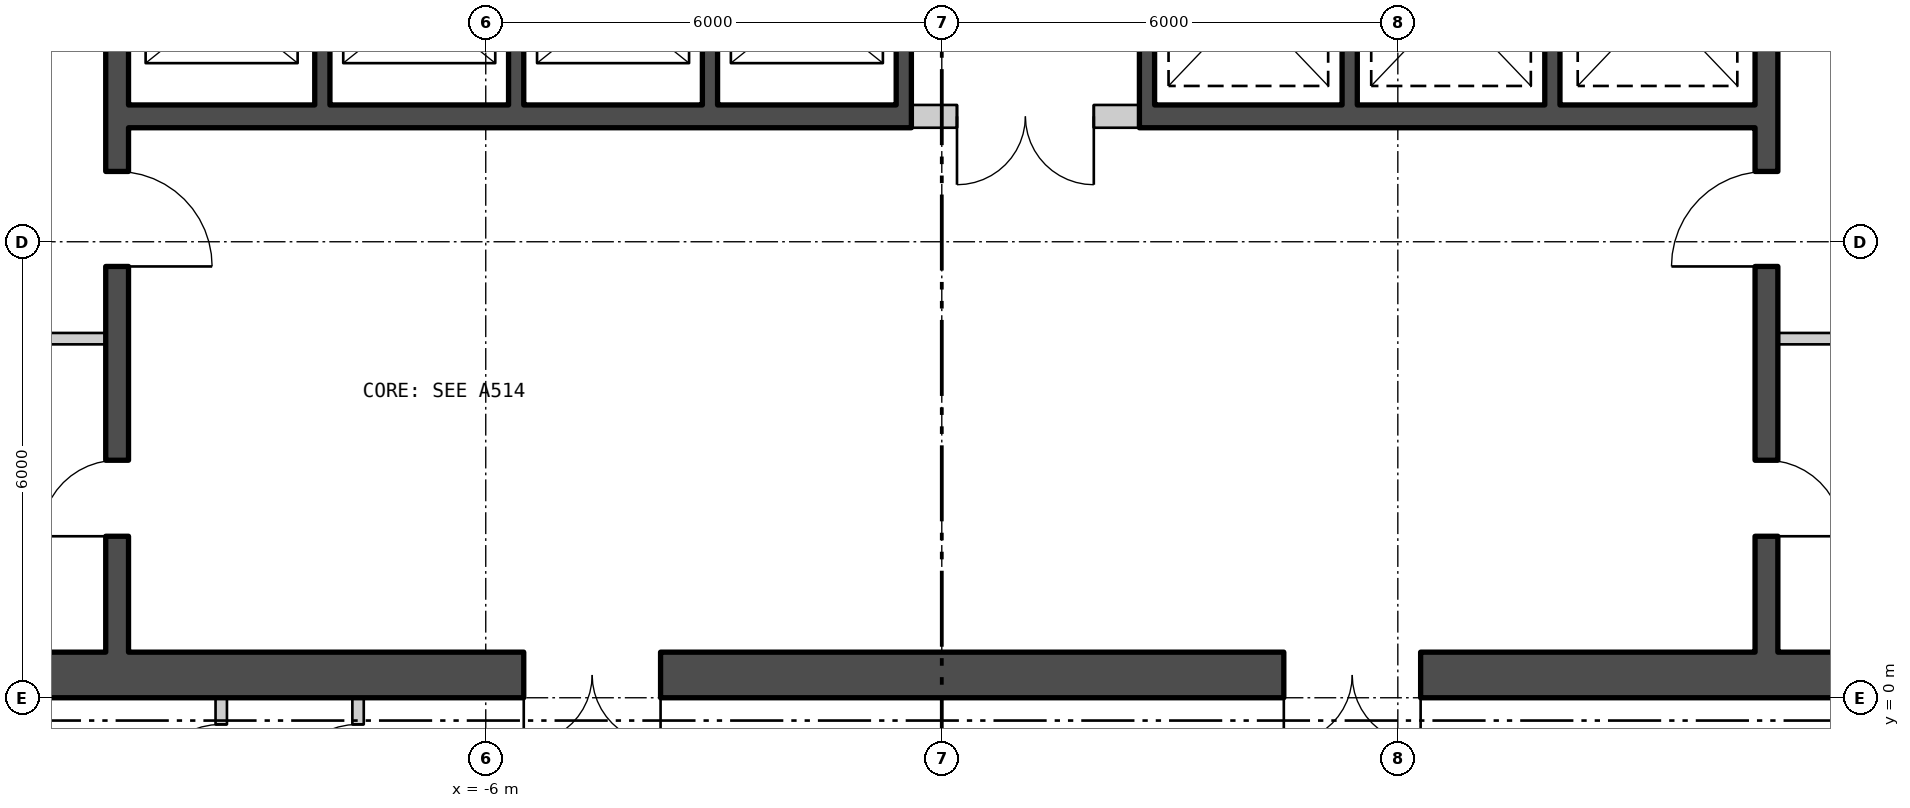
"""IFC4 building model, lengths in metres.
Left out: names, types, materials, properties, quantities, classifications, styles, units other than length and angle.
Written with IfcOpenShell. Run it as: python <this file> out.ifc"""

import sys

from ifc_helpers import new_model, si_unit, direction, frame, frame_2d, origin, place, context, subcontext, project, spatial, polyline, rectangle, outline, extrude, element, fill, save


model = new_model("IFC4")
c1 = context("Model", 3, precision=1e-05, world=origin(), true_north=direction((0.0, 1.0)))
c2 = subcontext(c1, "Body", "Model", "MODEL_VIEW")
j1 = project(units=[si_unit("LENGTHUNIT", "METRE"), si_unit("PLANEANGLEUNIT", "RADIAN")], contexts=[c1])
p1 = place(None, origin())
s1 = spatial("IfcSite", under=j1, at=p1, CompositionType="ELEMENT")
p2 = place(p1, origin())
s2 = spatial("IfcBuilding", under=s1, at=p2, CompositionType="ELEMENT")
p3 = place(p2, frame((0.0, 0.0, 78.3)))
s3 = spatial("IfcBuildingStorey", under=s2, at=p3, CompositionType="ELEMENT", Elevation=78.3)
p4 = place(p3, frame((-28.09, 10.934, -0.18), z_axis=(0.0, 0.0, 1.0), x_axis=(0.500000711659, -0.866024992908, 0.0)))
e1 = element("IfcWall", 1, at=p4, inside=s3, PredefinedType="SOLIDWALL", context=c2, shape_type="SweptSolid", body=[
    extrude(outline(polyline([(-0.13, -0.225), (45.87, -0.225), (45.61, 0.225), (0.13, 0.225), (-0.13, -0.225)])), origin(), (0.0, 0.0, 1.0), 6.0),
])
p5 = place(p4, frame((1.424, 0.0, 1.38)))
e2 = element("IfcOpeningElement", 2, at=p5, cuts=e1, PredefinedType="OPENING", context=c2, shape_type="SweptSolid", body=[
    extrude(rectangle(XDim=2.4, YDim=3.6, at=frame_2d((1.2, 1.8))), frame((0.0, 0.235, 0.0), z_axis=(0.0, -1.0, 0.0), x_axis=(1.0, 0.0, 0.0)), (0.0, 0.0, 1.0), 0.47),
])
p6 = place(p4, frame((5.893, 0.0, 1.38)))
e3 = element("IfcOpeningElement", 3, at=p6, cuts=e1, PredefinedType="OPENING", context=c2, shape_type="SweptSolid", body=[
    extrude(rectangle(XDim=2.4, YDim=3.6, at=frame_2d((1.2, 1.8))), frame((0.0, 0.235, 0.0), z_axis=(0.0, -1.0, 0.0), x_axis=(1.0, 0.0, 0.0)), (0.0, 0.0, 1.0), 0.47),
])
p7 = place(p4, frame((10.401, 0.0, 1.38)))
e4 = element("IfcOpeningElement", 4, at=p7, cuts=e1, PredefinedType="OPENING", context=c2, shape_type="SweptSolid", body=[
    extrude(rectangle(XDim=2.4, YDim=3.6, at=frame_2d((1.2, 1.8))), frame((0.0, 0.235, 0.0), z_axis=(0.0, -1.0, 0.0), x_axis=(1.0, 0.0, 0.0)), (0.0, 0.0, 1.0), 0.47),
])
p8 = place(p4, frame((14.909, 0.0, 1.38)))
e5 = element("IfcOpeningElement", 5, at=p8, cuts=e1, PredefinedType="OPENING", context=c2, shape_type="SweptSolid", body=[
    extrude(rectangle(XDim=2.4, YDim=3.6, at=frame_2d((1.2, 1.8))), frame((0.0, 0.235, 0.0), z_axis=(0.0, -1.0, 0.0), x_axis=(1.0, 0.0, 0.0)), (0.0, 0.0, 1.0), 0.47),
])
p9 = place(p4, frame((19.416, 0.0, 1.38)))
e6 = element("IfcOpeningElement", 6, at=p9, cuts=e1, PredefinedType="OPENING", context=c2, shape_type="SweptSolid", body=[
    extrude(rectangle(XDim=2.4, YDim=3.6, at=frame_2d((1.2, 1.8))), frame((0.0, 0.235, 0.0), z_axis=(0.0, -1.0, 0.0), x_axis=(1.0, 0.0, 0.0)), (0.0, 0.0, 1.0), 0.47),
])
p10 = place(p4, frame((23.924, 0.0, 1.38)))
e7 = element("IfcOpeningElement", 7, at=p10, cuts=e1, PredefinedType="OPENING", context=c2, shape_type="SweptSolid", body=[
    extrude(rectangle(XDim=2.4, YDim=3.6, at=frame_2d((1.2, 1.8))), frame((0.0, 0.235, 0.0), z_axis=(0.0, -1.0, 0.0), x_axis=(1.0, 0.0, 0.0)), (0.0, 0.0, 1.0), 0.47),
])
p11 = place(p4, frame((28.431, 0.0, 1.38)))
e8 = element("IfcOpeningElement", 8, at=p11, cuts=e1, PredefinedType="OPENING", context=c2, shape_type="SweptSolid", body=[
    extrude(rectangle(XDim=2.4, YDim=3.6, at=frame_2d((1.2, 1.8))), frame((0.0, 0.235, 0.0), z_axis=(0.0, -1.0, 0.0), x_axis=(1.0, 0.0, 0.0)), (0.0, 0.0, 1.0), 0.47),
])
p12 = place(p4, frame((32.939, 0.0, 1.38)))
e9 = element("IfcOpeningElement", 9, at=p12, cuts=e1, PredefinedType="OPENING", context=c2, shape_type="SweptSolid", body=[
    extrude(rectangle(XDim=2.4, YDim=3.6, at=frame_2d((1.2, 1.8))), frame((0.0, 0.235, 0.0), z_axis=(0.0, -1.0, 0.0), x_axis=(1.0, 0.0, 0.0)), (0.0, 0.0, 1.0), 0.47),
])
p13 = place(p4, frame((37.447, 0.0, 1.38)))
e10 = element("IfcOpeningElement", 10, at=p13, cuts=e1, PredefinedType="OPENING", context=c2, shape_type="SweptSolid", body=[
    extrude(rectangle(XDim=2.4, YDim=3.6, at=frame_2d((1.2, 1.8))), frame((0.0, 0.235, 0.0), z_axis=(0.0, -1.0, 0.0), x_axis=(1.0, 0.0, 0.0)), (0.0, 0.0, 1.0), 0.47),
])
p14 = place(p4, frame((41.916, 0.0, 1.38)))
e11 = element("IfcOpeningElement", 11, at=p14, cuts=e1, PredefinedType="OPENING", context=c2, shape_type="SweptSolid", body=[
    extrude(rectangle(XDim=2.4, YDim=3.6, at=frame_2d((1.2, 1.8))), frame((0.0, 0.235, 0.0), z_axis=(0.0, -1.0, 0.0), x_axis=(1.0, 0.0, 0.0)), (0.0, 0.0, 1.0), 0.47),
])
p15 = place(p3, frame((5.22, -28.679, -0.18), z_axis=(0.0, 0.0, 1.0), x_axis=(0.500000711659, 0.866024992908, 0.0)))
e12 = element("IfcWall", 12, at=p15, inside=s3, PredefinedType="SOLIDWALL", context=c2, shape_type="SweptSolid", body=[
    extrude(outline(polyline([(-0.13, -0.225), (45.87, -0.225), (45.61, 0.225), (0.13, 0.225), (-0.13, -0.225)])), origin(), (0.0, 0.0, 1.0), 6.0),
])
p16 = place(p15, frame((1.424, 0.0, 1.38)))
e13 = element("IfcOpeningElement", 13, at=p16, cuts=e12, PredefinedType="OPENING", context=c2, shape_type="SweptSolid", body=[
    extrude(rectangle(XDim=2.4, YDim=3.6, at=frame_2d((1.2, 1.8))), frame((0.0, 0.235, 0.0), z_axis=(0.0, -1.0, 0.0), x_axis=(1.0, 0.0, 0.0)), (0.0, 0.0, 1.0), 0.47),
])
p17 = place(p15, frame((5.893, 0.0, 1.38)))
e14 = element("IfcOpeningElement", 14, at=p17, cuts=e12, PredefinedType="OPENING", context=c2, shape_type="SweptSolid", body=[
    extrude(rectangle(XDim=2.4, YDim=3.6, at=frame_2d((1.2, 1.8))), frame((0.0, 0.235, 0.0), z_axis=(0.0, -1.0, 0.0), x_axis=(1.0, 0.0, 0.0)), (0.0, 0.0, 1.0), 0.47),
])
p18 = place(p15, frame((10.401, 0.0, 1.38)))
e15 = element("IfcOpeningElement", 15, at=p18, cuts=e12, PredefinedType="OPENING", context=c2, shape_type="SweptSolid", body=[
    extrude(rectangle(XDim=2.4, YDim=3.6, at=frame_2d((1.2, 1.8))), frame((0.0, 0.235, 0.0), z_axis=(0.0, -1.0, 0.0), x_axis=(1.0, 0.0, 0.0)), (0.0, 0.0, 1.0), 0.47),
])
p19 = place(p15, frame((14.909, 0.0, 1.38)))
e16 = element("IfcOpeningElement", 16, at=p19, cuts=e12, PredefinedType="OPENING", context=c2, shape_type="SweptSolid", body=[
    extrude(rectangle(XDim=2.4, YDim=3.6, at=frame_2d((1.2, 1.8))), frame((0.0, 0.235, 0.0), z_axis=(0.0, -1.0, 0.0), x_axis=(1.0, 0.0, 0.0)), (0.0, 0.0, 1.0), 0.47),
])
p20 = place(p15, frame((19.416, 0.0, 1.38)))
e17 = element("IfcOpeningElement", 17, at=p20, cuts=e12, PredefinedType="OPENING", context=c2, shape_type="SweptSolid", body=[
    extrude(rectangle(XDim=2.4, YDim=3.6, at=frame_2d((1.2, 1.8))), frame((0.0, 0.235, 0.0), z_axis=(0.0, -1.0, 0.0), x_axis=(1.0, 0.0, 0.0)), (0.0, 0.0, 1.0), 0.47),
])
p21 = place(p15, frame((23.924, 0.0, 1.38)))
e18 = element("IfcOpeningElement", 18, at=p21, cuts=e12, PredefinedType="OPENING", context=c2, shape_type="SweptSolid", body=[
    extrude(rectangle(XDim=2.4, YDim=3.6, at=frame_2d((1.2, 1.8))), frame((0.0, 0.235, 0.0), z_axis=(0.0, -1.0, 0.0), x_axis=(1.0, 0.0, 0.0)), (0.0, 0.0, 1.0), 0.47),
])
p22 = place(p15, frame((28.431, 0.0, 1.38)))
e19 = element("IfcOpeningElement", 19, at=p22, cuts=e12, PredefinedType="OPENING", context=c2, shape_type="SweptSolid", body=[
    extrude(rectangle(XDim=2.4, YDim=3.6, at=frame_2d((1.2, 1.8))), frame((0.0, 0.235, 0.0), z_axis=(0.0, -1.0, 0.0), x_axis=(1.0, 0.0, 0.0)), (0.0, 0.0, 1.0), 0.47),
])
p23 = place(p15, frame((32.939, 0.0, 1.38)))
e20 = element("IfcOpeningElement", 20, at=p23, cuts=e12, PredefinedType="OPENING", context=c2, shape_type="SweptSolid", body=[
    extrude(rectangle(XDim=2.4, YDim=3.6, at=frame_2d((1.2, 1.8))), frame((0.0, 0.235, 0.0), z_axis=(0.0, -1.0, 0.0), x_axis=(1.0, 0.0, 0.0)), (0.0, 0.0, 1.0), 0.47),
])
p24 = place(p15, frame((37.447, 0.0, 1.38)))
e21 = element("IfcOpeningElement", 21, at=p24, cuts=e12, PredefinedType="OPENING", context=c2, shape_type="SweptSolid", body=[
    extrude(rectangle(XDim=2.4, YDim=3.6, at=frame_2d((1.2, 1.8))), frame((0.0, 0.235, 0.0), z_axis=(0.0, -1.0, 0.0), x_axis=(1.0, 0.0, 0.0)), (0.0, 0.0, 1.0), 0.47),
])
p25 = place(p15, frame((41.916, 0.0, 1.38)))
e22 = element("IfcOpeningElement", 22, at=p25, cuts=e12, PredefinedType="OPENING", context=c2, shape_type="SweptSolid", body=[
    extrude(rectangle(XDim=2.4, YDim=3.6, at=frame_2d((1.2, 1.8))), frame((0.0, 0.235, 0.0), z_axis=(0.0, -1.0, 0.0), x_axis=(1.0, 0.0, 0.0)), (0.0, 0.0, 1.0), 0.47),
])
p26 = place(p3, frame((-17.5, 0.3, 0.0), z_axis=(0.0, 0.0, 1.0), x_axis=(1.0, 0.0, 0.0)))
e23 = element("IfcWall", 23, at=p26, inside=s3, PredefinedType="SHEAR", context=c2, shape_type="SweptSolid", body=[
    extrude(rectangle(XDim=35.0, YDim=0.6, at=frame_2d((17.5, 0.0))), origin(), (0.0, 0.0, 1.0), 5.8),
])
p27 = place(p26, frame((12.0, 0.0, 0.0)))
e24 = element("IfcOpeningElement", 24, at=p27, cuts=e23, PredefinedType="OPENING", context=c2, shape_type="SweptSolid", body=[
    extrude(rectangle(XDim=1.8, YDim=2.4, at=frame_2d((0.9, 1.2))), frame((0.0, 0.31, 0.0), z_axis=(0.0, -1.0, 0.0), x_axis=(1.0, 0.0, 0.0)), (0.0, 0.0, 1.0), 0.62),
])
p28 = place(p26, frame((22.0, 0.0, 0.0)))
e25 = element("IfcOpeningElement", 25, at=p28, cuts=e23, PredefinedType="OPENING", context=c2, shape_type="SweptSolid", body=[
    extrude(rectangle(XDim=1.8, YDim=2.4, at=frame_2d((0.9, 1.2))), frame((0.0, 0.31, 0.0), z_axis=(0.0, -1.0, 0.0), x_axis=(1.0, 0.0, 0.0)), (0.0, 0.0, 1.0), 0.62),
])
p29 = place(p3, frame((-10.85, 0.6, 0.0), z_axis=(0.0, 0.0, 1.0), x_axis=(0.0, 1.0, 0.0)))
e26 = element("IfcWall", 26, at=p29, inside=s3, PredefinedType="SHEAR", context=c2, shape_type="SweptSolid", body=[
    extrude(rectangle(XDim=16.8, YDim=0.3, at=frame_2d((8.4, 0.0))), origin(), (0.0, 0.0, 1.0), 5.8),
])
p30 = place(p29, frame((5.075, 0.0, 0.0)))
e27 = element("IfcOpeningElement", 27, at=p30, cuts=e26, PredefinedType="OPENING", context=c2, shape_type="SweptSolid", body=[
    extrude(rectangle(XDim=1.25, YDim=2.1, at=frame_2d((0.625, 1.05))), frame((0.0, 0.16, 0.0), z_axis=(0.0, -1.0, 0.0), x_axis=(1.0, 0.0, 0.0)), (0.0, 0.0, 1.0), 0.32),
])
p31 = place(p29, frame((1.525, 0.0, 0.0)))
e28 = element("IfcOpeningElement", 28, at=p31, cuts=e26, PredefinedType="OPENING", context=c2, shape_type="SweptSolid", body=[
    extrude(rectangle(XDim=1.0, YDim=2.1, at=frame_2d((0.5, 1.05))), frame((0.0, 0.16, 0.0), z_axis=(0.0, -1.0, 0.0), x_axis=(1.0, 0.0, 0.0)), (0.0, 0.0, 1.0), 0.32),
])
p32 = place(p3, frame((10.85, 0.6, 0.0), z_axis=(0.0, 0.0, 1.0), x_axis=(0.0, 1.0, 0.0)))
e29 = element("IfcWall", 29, at=p32, inside=s3, PredefinedType="SHEAR", context=c2, shape_type="SweptSolid", body=[
    extrude(rectangle(XDim=16.8, YDim=0.3, at=frame_2d((8.4, 0.0))), origin(), (0.0, 0.0, 1.0), 5.8),
])
p33 = place(p32, frame((5.075, 0.0, 0.0)))
e30 = element("IfcOpeningElement", 30, at=p33, cuts=e29, PredefinedType="OPENING", context=c2, shape_type="SweptSolid", body=[
    extrude(rectangle(XDim=1.25, YDim=2.1, at=frame_2d((0.625, 1.05))), frame((0.0, 0.16, 0.0), z_axis=(0.0, -1.0, 0.0), x_axis=(1.0, 0.0, 0.0)), (0.0, 0.0, 1.0), 0.32),
])
p34 = place(p32, frame((1.525, 0.0, 0.0)))
e31 = element("IfcOpeningElement", 31, at=p34, cuts=e29, PredefinedType="OPENING", context=c2, shape_type="SweptSolid", body=[
    extrude(rectangle(XDim=1.0, YDim=2.1, at=frame_2d((0.5, 1.05))), frame((0.0, 0.16, 0.0), z_axis=(0.0, -1.0, 0.0), x_axis=(1.0, 0.0, 0.0)), (0.0, 0.0, 1.0), 0.32),
])
p35 = place(p3, frame((-10.7, 7.65, 0.0), z_axis=(0.0, 0.0, 1.0), x_axis=(1.0, 0.0, 0.0)))
e32 = element("IfcWall", 32, at=p35, inside=s3, PredefinedType="SHEAR", context=c2, shape_type="SweptSolid", body=[
    extrude(rectangle(XDim=10.3, YDim=0.3, at=frame_2d((5.15, 0.0))), origin(), (0.0, 0.0, 1.0), 5.8),
])
p36 = place(p3, frame((2.6, 7.65, 0.0), z_axis=(0.0, 0.0, 1.0), x_axis=(1.0, 0.0, 0.0)))
e33 = element("IfcWall", 33, at=p36, inside=s3, PredefinedType="SHEAR", context=c2, shape_type="SweptSolid", body=[
    extrude(rectangle(XDim=8.1, YDim=0.3, at=frame_2d((4.05, 0.0))), origin(), (0.0, 0.0, 1.0), 5.8),
])
for number, where, z_axis, x_axis in (
    (34, (-8.15, 7.8, 0.0), (0.0, 0.0, 1.0), (0.0, 1.0, 0.0)),
    (35, (-5.6, 7.8, 0.0), (0.0, 0.0, 1.0), (0.0, 1.0, 0.0)),
    (36, (-3.05, 7.8, 0.0), (0.0, 0.0, 1.0), (0.0, 1.0, 0.0)),
    (37, (-0.5, 7.8, 0.0), (0.0, 0.0, 1.0), (0.0, 1.0, 0.0)),
    (38, (2.7, 7.8, 0.0), (0.0, 0.0, 1.0), (0.0, 1.0, 0.0)),
    (39, (5.367, 7.8, 0.0), (0.0, 0.0, 1.0), (0.0, 1.0, 0.0)),
    (40, (8.033, 7.8, 0.0), (0.0, 0.0, 1.0), (0.0, 1.0, 0.0)),
):
    element("IfcWall", number, at=place(p3, frame(where, z_axis=z_axis, x_axis=x_axis)), inside=s3, PredefinedType="SHEAR", context=c2, shape_type="SweptSolid", body=[
        extrude(rectangle(XDim=2.7, YDim=0.2, at=frame_2d((1.35, 0.0))), origin(), (0.0, 0.0, 1.0), 5.8),
    ])
for number, where, z_axis, x_axis in (
    (41, (-14.2, 4.725, 0.0), (0.0, 0.0, 1.0), (1.0, 0.0, 0.0)),
    (42, (11.0, 4.725, 0.0), (0.0, 0.0, 1.0), (1.0, 0.0, 0.0)),
):
    element("IfcWall", number, at=place(p3, frame(where, z_axis=z_axis, x_axis=x_axis)), inside=s3, PredefinedType="PARTITIONING", context=c2, shape_type="SweptSolid", body=[
        extrude(rectangle(XDim=3.2, YDim=0.15, at=frame_2d((1.6, 0.0))), origin(), (0.0, 0.0, 1.0), 5.8),
    ])
p37 = place(p3, frame((-0.4, 7.65, 0.0), z_axis=(0.0, 0.0, 1.0), x_axis=(1.0, 0.0, 0.0)))
e43 = element("IfcWall", 43, at=p37, inside=s3, PredefinedType="PARTITIONING", context=c2, shape_type="SweptSolid", body=[
    extrude(rectangle(XDim=3.0, YDim=0.3, at=frame_2d((1.5, 0.0))), origin(), (0.0, 0.0, 1.0), 5.8),
])
p38 = place(p37, frame((0.6, 0.0, 0.0)))
e44 = element("IfcOpeningElement", 44, at=p38, cuts=e43, PredefinedType="OPENING", context=c2, shape_type="SweptSolid", body=[
    extrude(rectangle(XDim=1.8, YDim=2.4, at=frame_2d((0.9, 1.2))), frame((0.0, 0.16, 0.0), z_axis=(0.0, -1.0, 0.0), x_axis=(1.0, 0.0, 0.0)), (0.0, 0.0, 1.0), 0.32),
])
p39 = place(p3, frame((-9.48, -1.699, 0.0), z_axis=(0.0, 0.0, 1.0), x_axis=(0.0, 1.0, 0.0)))
e45 = element("IfcWall", 45, at=p39, inside=s3, PredefinedType="PARTITIONING", context=c2, shape_type="SweptSolid", body=[
    extrude(rectangle(XDim=1.698, YDim=0.15, at=frame_2d((0.849, 0.0))), origin(), (0.0, 0.0, 1.0), 5.2),
])
p40 = place(p39, frame((0.349, 0.0, 0.0)))
e46 = element("IfcOpeningElement", 46, at=p40, cuts=e45, PredefinedType="OPENING", context=c2, shape_type="SweptSolid", body=[
    extrude(rectangle(XDim=1.0, YDim=2.1, at=frame_2d((0.5, 1.05))), frame((0.0, 0.085, 0.0), z_axis=(0.0, -1.0, 0.0), x_axis=(1.0, 0.0, 0.0)), (0.0, 0.0, 1.0), 0.17),
])
p41 = place(p3, frame((-7.68, -1.699, 0.0), z_axis=(0.0, 0.0, 1.0), x_axis=(0.0, 1.0, 0.0)))
e47 = element("IfcWall", 47, at=p41, inside=s3, PredefinedType="PARTITIONING", context=c2, shape_type="SweptSolid", body=[
    extrude(rectangle(XDim=1.698, YDim=0.15, at=frame_2d((0.849, 0.0))), origin(), (0.0, 0.0, 1.0), 5.8),
])
p42 = place(p41, frame((0.349, 0.0, 0.0)))
e48 = element("IfcOpeningElement", 48, at=p42, cuts=e47, PredefinedType="OPENING", context=c2, shape_type="SweptSolid", body=[
    extrude(rectangle(XDim=1.0, YDim=2.1, at=frame_2d((0.5, 1.05))), frame((0.0, 0.085, 0.0), z_axis=(0.0, -1.0, 0.0), x_axis=(1.0, 0.0, 0.0)), (0.0, 0.0, 1.0), 0.17),
])
p43 = place(p30, origin())
e49 = element("IfcDoor", 49, at=p43, inside=s3, OperationType="SINGLE_SWING_LEFT", PredefinedType="DOOR", context=c2, shape_type="SweptSolid", body=[
    extrude(rectangle(XDim=1.25, YDim=2.1, at=frame_2d((0.625, 1.05))), frame((0.0, 0.025, 0.0), z_axis=(0.0, -1.0, 0.0), x_axis=(1.0, 0.0, 0.0)), (0.0, 0.0, 1.0), 0.05),
])
fill(e27, e49)
p44 = place(p31, origin())
e50 = element("IfcDoor", 50, at=p44, inside=s3, OperationType="SINGLE_SWING_RIGHT", PredefinedType="DOOR", context=c2, shape_type="SweptSolid", body=[
    extrude(rectangle(XDim=1.0, YDim=2.1, at=frame_2d((0.5, 1.05))), frame((0.0, 0.025, 0.0), z_axis=(0.0, -1.0, 0.0), x_axis=(1.0, 0.0, 0.0)), (0.0, 0.0, 1.0), 0.05),
])
fill(e28, e50)
p45 = place(p33, origin())
e51 = element("IfcDoor", 51, at=p45, inside=s3, OperationType="SINGLE_SWING_RIGHT", PredefinedType="DOOR", context=c2, shape_type="SweptSolid", body=[
    extrude(rectangle(XDim=1.25, YDim=2.1, at=frame_2d((0.625, 1.05))), frame((0.0, 0.025, 0.0), z_axis=(0.0, -1.0, 0.0), x_axis=(1.0, 0.0, 0.0)), (0.0, 0.0, 1.0), 0.05),
])
fill(e30, e51)
p46 = place(p34, origin())
e52 = element("IfcDoor", 52, at=p46, inside=s3, OperationType="SINGLE_SWING_LEFT", PredefinedType="DOOR", context=c2, shape_type="SweptSolid", body=[
    extrude(rectangle(XDim=1.0, YDim=2.1, at=frame_2d((0.5, 1.05))), frame((0.0, 0.025, 0.0), z_axis=(0.0, -1.0, 0.0), x_axis=(1.0, 0.0, 0.0)), (0.0, 0.0, 1.0), 0.05),
])
fill(e31, e52)
p47 = place(p38, origin())
e53 = element("IfcDoor", 53, at=p47, inside=s3, OperationType="DOUBLE_DOOR_SINGLE_SWING", PredefinedType="DOOR", context=c2, shape_type="SweptSolid", body=[
    extrude(rectangle(XDim=1.8, YDim=2.4, at=frame_2d((0.9, 1.2))), frame((0.0, 0.025, 0.0), z_axis=(0.0, -1.0, 0.0), x_axis=(1.0, 0.0, 0.0)), (0.0, 0.0, 1.0), 0.05),
])
fill(e44, e53)
p48 = place(p27, origin())
e54 = element("IfcDoor", 54, at=p48, inside=s3, OperationType="DOUBLE_DOOR_SINGLE_SWING", PredefinedType="DOOR", context=c2, shape_type="SweptSolid", body=[
    extrude(rectangle(XDim=1.8, YDim=2.4, at=frame_2d((0.9, 1.2))), frame((0.0, 0.025, 0.0), z_axis=(0.0, -1.0, 0.0), x_axis=(1.0, 0.0, 0.0)), (0.0, 0.0, 1.0), 0.05),
])
fill(e24, e54)
p49 = place(p28, origin())
e55 = element("IfcDoor", 55, at=p49, inside=s3, OperationType="DOUBLE_DOOR_SINGLE_SWING", PredefinedType="DOOR", context=c2, shape_type="SweptSolid", body=[
    extrude(rectangle(XDim=1.8, YDim=2.4, at=frame_2d((0.9, 1.2))), frame((0.0, 0.025, 0.0), z_axis=(0.0, -1.0, 0.0), x_axis=(1.0, 0.0, 0.0)), (0.0, 0.0, 1.0), 0.05),
])
fill(e25, e55)
p50 = place(p40, origin())
e56 = element("IfcDoor", 56, at=p50, inside=s3, OperationType="SINGLE_SWING_RIGHT", PredefinedType="DOOR", context=c2, shape_type="SweptSolid", body=[
    extrude(rectangle(XDim=1.0, YDim=2.1, at=frame_2d((0.5, 1.05))), frame((0.0, 0.025, 0.0), z_axis=(0.0, -1.0, 0.0), x_axis=(1.0, 0.0, 0.0)), (0.0, 0.0, 1.0), 0.05),
])
fill(e46, e56)
p51 = place(p42, origin())
e57 = element("IfcDoor", 57, at=p51, inside=s3, OperationType="SINGLE_SWING_RIGHT", PredefinedType="DOOR", context=c2, shape_type="SweptSolid", body=[
    extrude(rectangle(XDim=1.0, YDim=2.1, at=frame_2d((0.5, 1.05))), frame((0.0, 0.025, 0.0), z_axis=(0.0, -1.0, 0.0), x_axis=(1.0, 0.0, 0.0)), (0.0, 0.0, 1.0), 0.05),
])
fill(e48, e57)
save(model, sys.argv[1])
